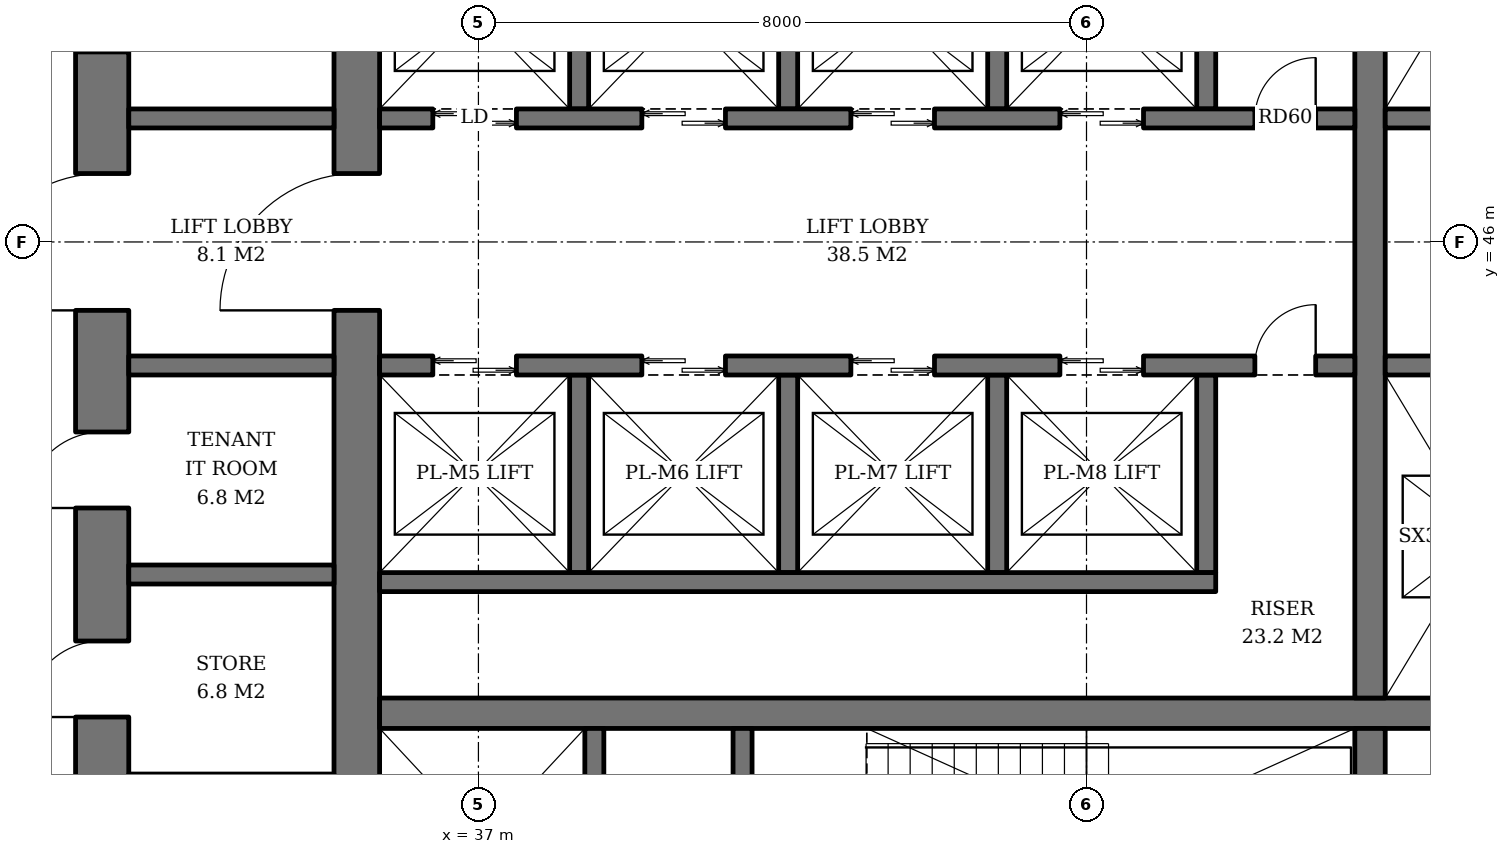
"""IFC4 building model, lengths in metres.
Left out: names, types, materials, properties, quantities, classifications, styles, units other than length and angle.
Written with IfcOpenShell. Run it as: python <this file> out.ifc"""

import sys

from ifc_helpers import new_model, si_unit, direction, frame, frame_2d, origin, place, context, subcontext, project, spatial, rectangle, extrude, element, fill, save


model = new_model("IFC4")
c1 = context("Model", 3, precision=1e-05, world=origin(), true_north=direction((0.0, 1.0)))
c2 = subcontext(c1, "Body", "Model", "MODEL_VIEW")
j1 = project(units=[si_unit("LENGTHUNIT", "METRE"), si_unit("PLANEANGLEUNIT", "RADIAN")], contexts=[c1])
p1 = place(None, origin())
s1 = spatial("IfcSite", under=j1, at=p1, CompositionType="ELEMENT")
p2 = place(p1, origin())
s2 = spatial("IfcBuilding", under=s1, at=p2, CompositionType="ELEMENT")
p3 = place(p2, frame((0.0, 0.0, 127.4)))
s3 = spatial("IfcBuildingStorey", under=s2, at=p3, CompositionType="ELEMENT", Elevation=127.4)
p4 = place(p3, frame((35.4, 36.7, 0.0), z_axis=(0.0, 0.0, 1.0), x_axis=(0.0, 1.0, 0.0)))
e1 = element("IfcWall", 1, at=p4, inside=s3, PredefinedType="SHEAR", context=c2, shape_type="SweptSolid", body=[
    extrude(rectangle(XDim=18.6, YDim=0.6, at=frame_2d((9.3, 0.0))), origin(), (0.0, 0.0, 1.0), 3.8),
])
p5 = place(p4, frame((8.4, 0.0, 0.0)))
e2 = element("IfcOpeningElement", 2, at=p5, cuts=e1, PredefinedType="OPENING", context=c2, shape_type="SweptSolid", body=[
    extrude(rectangle(XDim=1.8, YDim=2.4, at=frame_2d((0.9, 1.2))), frame((0.0, 0.31, 0.0), z_axis=(0.0, -1.0, 0.0), x_axis=(1.0, 0.0, 0.0)), (0.0, 0.0, 1.0), 0.62),
])
p6 = place(p3, frame((32.05, 33.4, 0.0), z_axis=(0.0, 0.0, 1.0), x_axis=(0.0, 1.0, 0.0)))
e3 = element("IfcWall", 3, at=p6, inside=s3, PredefinedType="SHEAR", context=c2, shape_type="SweptSolid", body=[
    extrude(rectangle(XDim=25.2, YDim=0.7, at=frame_2d((12.6, 0.0))), origin(), (0.0, 0.0, 1.0), 3.8),
])
p7 = place(p6, frame((11.7, 0.0, 0.0)))
e4 = element("IfcOpeningElement", 4, at=p7, cuts=e3, PredefinedType="OPENING", context=c2, shape_type="SweptSolid", body=[
    extrude(rectangle(XDim=1.8, YDim=2.4, at=frame_2d((0.9, 1.2))), frame((0.0, 0.36, 0.0), z_axis=(0.0, -1.0, 0.0), x_axis=(1.0, 0.0, 0.0)), (0.0, 0.0, 1.0), 0.72),
])
p8 = place(p6, frame((3.6, 0.0, 0.0)))
e5 = element("IfcOpeningElement", 5, at=p8, cuts=e3, PredefinedType="OPENING", context=c2, shape_type="SweptSolid", body=[
    extrude(rectangle(XDim=1.0, YDim=2.1, at=frame_2d((0.5, 1.05))), frame((0.0, 0.36, 0.0), z_axis=(0.0, -1.0, 0.0), x_axis=(1.0, 0.0, 0.0)), (0.0, 0.0, 1.0), 0.72),
])
p9 = place(p6, frame((6.35, 0.0, 0.0)))
e6 = element("IfcOpeningElement", 6, at=p9, cuts=e3, PredefinedType="OPENING", context=c2, shape_type="SweptSolid", body=[
    extrude(rectangle(XDim=1.0, YDim=2.1, at=frame_2d((0.5, 1.05))), frame((0.0, 0.36, 0.0), z_axis=(0.0, -1.0, 0.0), x_axis=(1.0, 0.0, 0.0)), (0.0, 0.0, 1.0), 0.72),
])
p10 = place(p6, frame((9.1, 0.0, 0.0)))
e7 = element("IfcOpeningElement", 7, at=p10, cuts=e3, PredefinedType="OPENING", context=c2, shape_type="SweptSolid", body=[
    extrude(rectangle(XDim=1.0, YDim=2.1, at=frame_2d((0.5, 1.05))), frame((0.0, 0.36, 0.0), z_axis=(0.0, -1.0, 0.0), x_axis=(1.0, 0.0, 0.0)), (0.0, 0.0, 1.0), 0.72),
])
p11 = place(p6, frame((15.1, 0.0, 0.0)))
e8 = element("IfcOpeningElement", 8, at=p11, cuts=e3, PredefinedType="OPENING", context=c2, shape_type="SweptSolid", body=[
    extrude(rectangle(XDim=1.0, YDim=2.1, at=frame_2d((0.5, 1.05))), frame((0.0, 0.36, 0.0), z_axis=(0.0, -1.0, 0.0), x_axis=(1.0, 0.0, 0.0)), (0.0, 0.0, 1.0), 0.72),
])
p12 = place(p6, frame((17.85, 0.0, 0.0)))
e9 = element("IfcOpeningElement", 9, at=p12, cuts=e3, PredefinedType="OPENING", context=c2, shape_type="SweptSolid", body=[
    extrude(rectangle(XDim=1.0, YDim=2.1, at=frame_2d((0.5, 1.05))), frame((0.0, 0.36, 0.0), z_axis=(0.0, -1.0, 0.0), x_axis=(1.0, 0.0, 0.0)), (0.0, 0.0, 1.0), 0.72),
])
p13 = place(p3, frame((35.7, 39.8, 0.0), z_axis=(0.0, 0.0, 1.0), x_axis=(1.0, 0.0, 0.0)))
e10 = element("IfcWall", 10, at=p13, inside=s3, PredefinedType="SHEAR", context=c2, shape_type="SweptSolid", body=[
    extrude(rectangle(XDim=18.6, YDim=0.4, at=frame_2d((9.3, 0.0))), origin(), (0.0, 0.0, 1.0), 3.8),
])
p14 = place(p3, frame((48.73, 36.7, 0.0), z_axis=(0.0, 0.0, 1.0), x_axis=(0.0, 1.0, 0.0)))
e11 = element("IfcWall", 11, at=p14, inside=s3, PredefinedType="SHEAR", context=c2, shape_type="SweptSolid", body=[
    extrude(rectangle(XDim=2.9, YDim=0.4, at=frame_2d((1.45, 0.0))), origin(), (0.0, 0.0, 1.0), 3.8),
])
p15 = place(p3, frame((48.73, 40.0, 0.0), z_axis=(0.0, 0.0, 1.0), x_axis=(0.0, 1.0, 0.0)))
e12 = element("IfcWall", 12, at=p15, inside=s3, PredefinedType="SHEAR", context=c2, shape_type="SweptSolid", body=[
    extrude(rectangle(XDim=12.0, YDim=0.4, at=frame_2d((6.0, 0.0))), origin(), (0.0, 0.0, 1.0), 3.8),
])
p16 = place(p3, frame((38.525, 36.7, 0.0), z_axis=(0.0, 0.0, 1.0), x_axis=(0.0, 1.0, 0.0)))
e13 = element("IfcWall", 13, at=p16, inside=s3, PredefinedType="SHEAR", context=c2, shape_type="SweptSolid", body=[
    extrude(rectangle(XDim=2.9, YDim=0.25, at=frame_2d((1.45, 0.0))), origin(), (0.0, 0.0, 1.0), 3.8),
])
p17 = place(p16, frame((0.8, 0.0, 0.0)))
e14 = element("IfcOpeningElement", 14, at=p17, cuts=e13, PredefinedType="OPENING", context=c2, shape_type="SweptSolid", body=[
    extrude(rectangle(XDim=1.3, YDim=2.2, at=frame_2d((0.65, 1.1))), frame((0.0, 0.135, 0.0), z_axis=(0.0, -1.0, 0.0), x_axis=(1.0, 0.0, 0.0)), (0.0, 0.0, 1.0), 0.27),
])
p18 = place(p3, frame((40.475, 36.7, 0.0), z_axis=(0.0, 0.0, 1.0), x_axis=(0.0, 1.0, 0.0)))
e15 = element("IfcWall", 15, at=p18, inside=s3, PredefinedType="SHEAR", context=c2, shape_type="SweptSolid", body=[
    extrude(rectangle(XDim=2.9, YDim=0.25, at=frame_2d((1.45, 0.0))), origin(), (0.0, 0.0, 1.0), 3.8),
])
p19 = place(p18, frame((0.75, 0.0, 0.0)))
e16 = element("IfcOpeningElement", 16, at=p19, cuts=e15, PredefinedType="OPENING", context=c2, shape_type="SweptSolid", body=[
    extrude(rectangle(XDim=1.2, YDim=2.1, at=frame_2d((0.6, 1.05))), frame((0.0, 0.135, 0.0), z_axis=(0.0, -1.0, 0.0), x_axis=(1.0, 0.0, 0.0)), (0.0, 0.0, 1.0), 0.27),
])
for number, where, z_axis, x_axis in (
    (17, (38.325, 47.75, 0.0), (0.0, 0.0, 1.0), (0.0, 1.0, 0.0)),
    (18, (41.075, 47.75, 0.0), (0.0, 0.0, 1.0), (0.0, 1.0, 0.0)),
    (19, (43.825, 47.75, 0.0), (0.0, 0.0, 1.0), (0.0, 1.0, 0.0)),
    (20, (46.575, 47.75, 0.0), (0.0, 0.0, 1.0), (0.0, 1.0, 0.0)),
):
    element("IfcWall", number, at=place(p3, frame(where, z_axis=z_axis, x_axis=x_axis)), inside=s3, PredefinedType="SHEAR", context=c2, shape_type="SweptSolid", body=[
        extrude(rectangle(XDim=2.6, YDim=0.25, at=frame_2d((1.3, 0.0))), origin(), (0.0, 0.0, 1.0), 3.8),
    ])
p20 = place(p3, frame((35.7, 47.625, 0.0), z_axis=(0.0, 0.0, 1.0), x_axis=(1.0, 0.0, 0.0)))
e21 = element("IfcWall", 21, at=p20, inside=s3, PredefinedType="SHEAR", context=c2, shape_type="SweptSolid", body=[
    extrude(rectangle(XDim=12.83, YDim=0.25, at=frame_2d((6.415, 0.0))), origin(), (0.0, 0.0, 1.0), 3.8),
])
p21 = place(p20, frame((0.7, 0.0, 0.0)))
e22 = element("IfcOpeningElement", 22, at=p21, cuts=e21, PredefinedType="OPENING", context=c2, shape_type="SweptSolid", body=[
    extrude(rectangle(XDim=1.1, YDim=2.2, at=frame_2d((0.55, 1.1))), frame((0.0, 0.135, 0.0), z_axis=(0.0, -1.0, 0.0), x_axis=(1.0, 0.0, 0.0)), (0.0, 0.0, 1.0), 0.27),
])
p22 = place(p20, frame((3.45, 0.0, 0.0)))
e23 = element("IfcOpeningElement", 23, at=p22, cuts=e21, PredefinedType="OPENING", context=c2, shape_type="SweptSolid", body=[
    extrude(rectangle(XDim=1.1, YDim=2.2, at=frame_2d((0.55, 1.1))), frame((0.0, 0.135, 0.0), z_axis=(0.0, -1.0, 0.0), x_axis=(1.0, 0.0, 0.0)), (0.0, 0.0, 1.0), 0.27),
])
p23 = place(p20, frame((6.2, 0.0, 0.0)))
e24 = element("IfcOpeningElement", 24, at=p23, cuts=e21, PredefinedType="OPENING", context=c2, shape_type="SweptSolid", body=[
    extrude(rectangle(XDim=1.1, YDim=2.2, at=frame_2d((0.55, 1.1))), frame((0.0, 0.135, 0.0), z_axis=(0.0, -1.0, 0.0), x_axis=(1.0, 0.0, 0.0)), (0.0, 0.0, 1.0), 0.27),
])
p24 = place(p20, frame((8.95, 0.0, 0.0)))
e25 = element("IfcOpeningElement", 25, at=p24, cuts=e21, PredefinedType="OPENING", context=c2, shape_type="SweptSolid", body=[
    extrude(rectangle(XDim=1.1, YDim=2.2, at=frame_2d((0.55, 1.1))), frame((0.0, 0.135, 0.0), z_axis=(0.0, -1.0, 0.0), x_axis=(1.0, 0.0, 0.0)), (0.0, 0.0, 1.0), 0.27),
])
p25 = place(p20, frame((11.515, 0.0, 0.0)))
e26 = element("IfcOpeningElement", 26, at=p25, cuts=e21, PredefinedType="OPENING", context=c2, shape_type="SweptSolid", body=[
    extrude(rectangle(XDim=0.8, YDim=2.0, at=frame_2d((0.4, 1.0))), frame((0.0, 0.135, 0.0), z_axis=(0.0, -1.0, 0.0), x_axis=(1.0, 0.0, 0.0)), (0.0, 0.0, 1.0), 0.27),
])
for number, where, z_axis, x_axis in (
    (27, (38.325, 44.25, 0.0), (0.0, 0.0, 1.0), (0.0, -1.0, 0.0)),
    (28, (41.075, 44.25, 0.0), (0.0, 0.0, 1.0), (0.0, -1.0, 0.0)),
    (29, (43.825, 44.25, 0.0), (0.0, 0.0, 1.0), (0.0, -1.0, 0.0)),
    (30, (46.575, 44.25, 0.0), (0.0, 0.0, 1.0), (0.0, -1.0, 0.0)),
):
    element("IfcWall", number, at=place(p3, frame(where, z_axis=z_axis, x_axis=x_axis)), inside=s3, PredefinedType="SHEAR", context=c2, shape_type="SweptSolid", body=[
        extrude(rectangle(XDim=2.6, YDim=0.25, at=frame_2d((1.3, 0.0))), origin(), (0.0, 0.0, 1.0), 3.8),
    ])
p26 = place(p3, frame((35.7, 41.525, 0.0), z_axis=(0.0, 0.0, 1.0), x_axis=(1.0, 0.0, 0.0)))
e31 = element("IfcWall", 31, at=p26, inside=s3, PredefinedType="SHEAR", context=c2, shape_type="SweptSolid", body=[
    extrude(rectangle(XDim=11.0, YDim=0.25, at=frame_2d((5.5, 0.0))), origin(), (0.0, 0.0, 1.0), 3.8),
])
p27 = place(p3, frame((35.7, 44.375, 0.0), z_axis=(0.0, 0.0, 1.0), x_axis=(1.0, 0.0, 0.0)))
e32 = element("IfcWall", 32, at=p27, inside=s3, PredefinedType="SHEAR", context=c2, shape_type="SweptSolid", body=[
    extrude(rectangle(XDim=12.83, YDim=0.25, at=frame_2d((6.415, 0.0))), origin(), (0.0, 0.0, 1.0), 3.8),
])
p28 = place(p27, frame((0.7, 0.0, 0.0)))
e33 = element("IfcOpeningElement", 33, at=p28, cuts=e32, PredefinedType="OPENING", context=c2, shape_type="SweptSolid", body=[
    extrude(rectangle(XDim=1.1, YDim=2.2, at=frame_2d((0.55, 1.1))), frame((0.0, 0.135, 0.0), z_axis=(0.0, -1.0, 0.0), x_axis=(1.0, 0.0, 0.0)), (0.0, 0.0, 1.0), 0.27),
])
p29 = place(p27, frame((3.45, 0.0, 0.0)))
e34 = element("IfcOpeningElement", 34, at=p29, cuts=e32, PredefinedType="OPENING", context=c2, shape_type="SweptSolid", body=[
    extrude(rectangle(XDim=1.1, YDim=2.2, at=frame_2d((0.55, 1.1))), frame((0.0, 0.135, 0.0), z_axis=(0.0, -1.0, 0.0), x_axis=(1.0, 0.0, 0.0)), (0.0, 0.0, 1.0), 0.27),
])
p30 = place(p27, frame((6.2, 0.0, 0.0)))
e35 = element("IfcOpeningElement", 35, at=p30, cuts=e32, PredefinedType="OPENING", context=c2, shape_type="SweptSolid", body=[
    extrude(rectangle(XDim=1.1, YDim=2.2, at=frame_2d((0.55, 1.1))), frame((0.0, 0.135, 0.0), z_axis=(0.0, -1.0, 0.0), x_axis=(1.0, 0.0, 0.0)), (0.0, 0.0, 1.0), 0.27),
])
p31 = place(p27, frame((8.95, 0.0, 0.0)))
e36 = element("IfcOpeningElement", 36, at=p31, cuts=e32, PredefinedType="OPENING", context=c2, shape_type="SweptSolid", body=[
    extrude(rectangle(XDim=1.1, YDim=2.2, at=frame_2d((0.55, 1.1))), frame((0.0, 0.135, 0.0), z_axis=(0.0, -1.0, 0.0), x_axis=(1.0, 0.0, 0.0)), (0.0, 0.0, 1.0), 0.27),
])
p32 = place(p27, frame((11.515, 0.0, 0.0)))
e37 = element("IfcOpeningElement", 37, at=p32, cuts=e32, PredefinedType="OPENING", context=c2, shape_type="SweptSolid", body=[
    extrude(rectangle(XDim=0.8, YDim=2.0, at=frame_2d((0.4, 1.0))), frame((0.0, 0.135, 0.0), z_axis=(0.0, -1.0, 0.0), x_axis=(1.0, 0.0, 0.0)), (0.0, 0.0, 1.0), 0.27),
])
for number, where, z_axis, x_axis in (
    (38, (48.93, 47.625, 0.0), (0.0, 0.0, 1.0), (1.0, 0.0, 0.0)),
    (39, (48.93, 44.375, 0.0), (0.0, 0.0, 1.0), (1.0, 0.0, 0.0)),
):
    element("IfcWall", number, at=place(p3, frame(where, z_axis=z_axis, x_axis=x_axis)), inside=s3, PredefinedType="SHEAR", context=c2, shape_type="SweptSolid", body=[
        extrude(rectangle(XDim=5.37, YDim=0.25, at=frame_2d((2.685, 0.0))), origin(), (0.0, 0.0, 1.0), 3.8),
    ])
for number, where, z_axis, x_axis in (
    (40, (32.4, 41.625, 0.0), (0.0, 0.0, 1.0), (1.0, 0.0, 0.0)),
    (41, (32.4, 44.375, 0.0), (0.0, 0.0, 1.0), (1.0, 0.0, 0.0)),
    (42, (32.4, 47.625, 0.0), (0.0, 0.0, 1.0), (1.0, 0.0, 0.0)),
):
    element("IfcWall", number, at=place(p3, frame(where, z_axis=z_axis, x_axis=x_axis)), inside=s3, PredefinedType="SHEAR", context=c2, shape_type="SweptSolid", body=[
        extrude(rectangle(XDim=2.7, YDim=0.25, at=frame_2d((1.35, 0.0))), origin(), (0.0, 0.0, 1.0), 3.8),
    ])
p33 = place(p21, origin())
e43 = element("IfcDoor", 43, at=p33, inside=s3, OperationType="DOUBLE_DOOR_SLIDING", PredefinedType="DOOR", context=c2, shape_type="SweptSolid", body=[
    extrude(rectangle(XDim=1.1, YDim=2.2, at=frame_2d((0.55, 1.1))), frame((0.0, 0.025, 0.0), z_axis=(0.0, -1.0, 0.0), x_axis=(1.0, 0.0, 0.0)), (0.0, 0.0, 1.0), 0.05),
])
fill(e22, e43)
p34 = place(p22, origin())
e44 = element("IfcDoor", 44, at=p34, inside=s3, OperationType="DOUBLE_DOOR_SLIDING", PredefinedType="DOOR", context=c2, shape_type="SweptSolid", body=[
    extrude(rectangle(XDim=1.1, YDim=2.2, at=frame_2d((0.55, 1.1))), frame((0.0, 0.025, 0.0), z_axis=(0.0, -1.0, 0.0), x_axis=(1.0, 0.0, 0.0)), (0.0, 0.0, 1.0), 0.05),
])
fill(e23, e44)
p35 = place(p23, origin())
e45 = element("IfcDoor", 45, at=p35, inside=s3, OperationType="DOUBLE_DOOR_SLIDING", PredefinedType="DOOR", context=c2, shape_type="SweptSolid", body=[
    extrude(rectangle(XDim=1.1, YDim=2.2, at=frame_2d((0.55, 1.1))), frame((0.0, 0.025, 0.0), z_axis=(0.0, -1.0, 0.0), x_axis=(1.0, 0.0, 0.0)), (0.0, 0.0, 1.0), 0.05),
])
fill(e24, e45)
p36 = place(p24, origin())
e46 = element("IfcDoor", 46, at=p36, inside=s3, OperationType="DOUBLE_DOOR_SLIDING", PredefinedType="DOOR", context=c2, shape_type="SweptSolid", body=[
    extrude(rectangle(XDim=1.1, YDim=2.2, at=frame_2d((0.55, 1.1))), frame((0.0, 0.025, 0.0), z_axis=(0.0, -1.0, 0.0), x_axis=(1.0, 0.0, 0.0)), (0.0, 0.0, 1.0), 0.05),
])
fill(e25, e46)
p37 = place(p25, origin())
e47 = element("IfcDoor", 47, at=p37, inside=s3, OperationType="SINGLE_SWING_RIGHT", PredefinedType="DOOR", context=c2, shape_type="SweptSolid", body=[
    extrude(rectangle(XDim=0.8, YDim=2.0, at=frame_2d((0.4, 1.0))), frame((0.0, 0.025, 0.0), z_axis=(0.0, -1.0, 0.0), x_axis=(1.0, 0.0, 0.0)), (0.0, 0.0, 1.0), 0.05),
])
fill(e26, e47)
p38 = place(p28, origin())
e48 = element("IfcDoor", 48, at=p38, inside=s3, OperationType="DOUBLE_DOOR_SLIDING", PredefinedType="DOOR", context=c2, shape_type="SweptSolid", body=[
    extrude(rectangle(XDim=1.1, YDim=2.2, at=frame_2d((0.55, 1.1))), frame((0.0, 0.025, 0.0), z_axis=(0.0, -1.0, 0.0), x_axis=(1.0, 0.0, 0.0)), (0.0, 0.0, 1.0), 0.05),
])
fill(e33, e48)
p39 = place(p29, origin())
e49 = element("IfcDoor", 49, at=p39, inside=s3, OperationType="DOUBLE_DOOR_SLIDING", PredefinedType="DOOR", context=c2, shape_type="SweptSolid", body=[
    extrude(rectangle(XDim=1.1, YDim=2.2, at=frame_2d((0.55, 1.1))), frame((0.0, 0.025, 0.0), z_axis=(0.0, -1.0, 0.0), x_axis=(1.0, 0.0, 0.0)), (0.0, 0.0, 1.0), 0.05),
])
fill(e34, e49)
p40 = place(p30, origin())
e50 = element("IfcDoor", 50, at=p40, inside=s3, OperationType="DOUBLE_DOOR_SLIDING", PredefinedType="DOOR", context=c2, shape_type="SweptSolid", body=[
    extrude(rectangle(XDim=1.1, YDim=2.2, at=frame_2d((0.55, 1.1))), frame((0.0, 0.025, 0.0), z_axis=(0.0, -1.0, 0.0), x_axis=(1.0, 0.0, 0.0)), (0.0, 0.0, 1.0), 0.05),
])
fill(e35, e50)
p41 = place(p31, origin())
e51 = element("IfcDoor", 51, at=p41, inside=s3, OperationType="DOUBLE_DOOR_SLIDING", PredefinedType="DOOR", context=c2, shape_type="SweptSolid", body=[
    extrude(rectangle(XDim=1.1, YDim=2.2, at=frame_2d((0.55, 1.1))), frame((0.0, 0.025, 0.0), z_axis=(0.0, -1.0, 0.0), x_axis=(1.0, 0.0, 0.0)), (0.0, 0.0, 1.0), 0.05),
])
fill(e36, e51)
p42 = place(p32, origin())
e52 = element("IfcDoor", 52, at=p42, inside=s3, OperationType="SINGLE_SWING_RIGHT", PredefinedType="DOOR", context=c2, shape_type="SweptSolid", body=[
    extrude(rectangle(XDim=0.8, YDim=2.0, at=frame_2d((0.4, 1.0))), frame((0.0, 0.025, 0.0), z_axis=(0.0, -1.0, 0.0), x_axis=(1.0, 0.0, 0.0)), (0.0, 0.0, 1.0), 0.05),
])
fill(e37, e52)
p43 = place(p5, origin())
e53 = element("IfcDoor", 53, at=p43, inside=s3, OperationType="DOUBLE_DOOR_SINGLE_SWING", PredefinedType="DOOR", context=c2, shape_type="SweptSolid", body=[
    extrude(rectangle(XDim=1.8, YDim=2.4, at=frame_2d((0.9, 1.2))), frame((0.0, 0.025, 0.0), z_axis=(0.0, -1.0, 0.0), x_axis=(1.0, 0.0, 0.0)), (0.0, 0.0, 1.0), 0.05),
])
fill(e2, e53)
p44 = place(p7, origin())
e54 = element("IfcDoor", 54, at=p44, inside=s3, OperationType="DOUBLE_DOOR_SINGLE_SWING", PredefinedType="DOOR", context=c2, shape_type="SweptSolid", body=[
    extrude(rectangle(XDim=1.8, YDim=2.4, at=frame_2d((0.9, 1.2))), frame((0.0, 0.025, 0.0), z_axis=(0.0, -1.0, 0.0), x_axis=(1.0, 0.0, 0.0)), (0.0, 0.0, 1.0), 0.05),
])
fill(e4, e54)
p45 = place(p9, origin())
e55 = element("IfcDoor", 55, at=p45, inside=s3, OperationType="SINGLE_SWING_LEFT", PredefinedType="DOOR", context=c2, shape_type="SweptSolid", body=[
    extrude(rectangle(XDim=1.0, YDim=2.1, at=frame_2d((0.5, 1.05))), frame((0.0, -0.29, 0.0), z_axis=(0.0, -1.0, 0.0), x_axis=(1.0, 0.0, 0.0)), (0.0, 0.0, 1.0), 0.05),
])
fill(e6, e55)
p46 = place(p10, origin())
e56 = element("IfcDoor", 56, at=p46, inside=s3, OperationType="SINGLE_SWING_LEFT", PredefinedType="DOOR", context=c2, shape_type="SweptSolid", body=[
    extrude(rectangle(XDim=1.0, YDim=2.1, at=frame_2d((0.5, 1.05))), frame((0.0, -0.29, 0.0), z_axis=(0.0, -1.0, 0.0), x_axis=(1.0, 0.0, 0.0)), (0.0, 0.0, 1.0), 0.05),
])
fill(e7, e56)
save(model, sys.argv[1])
